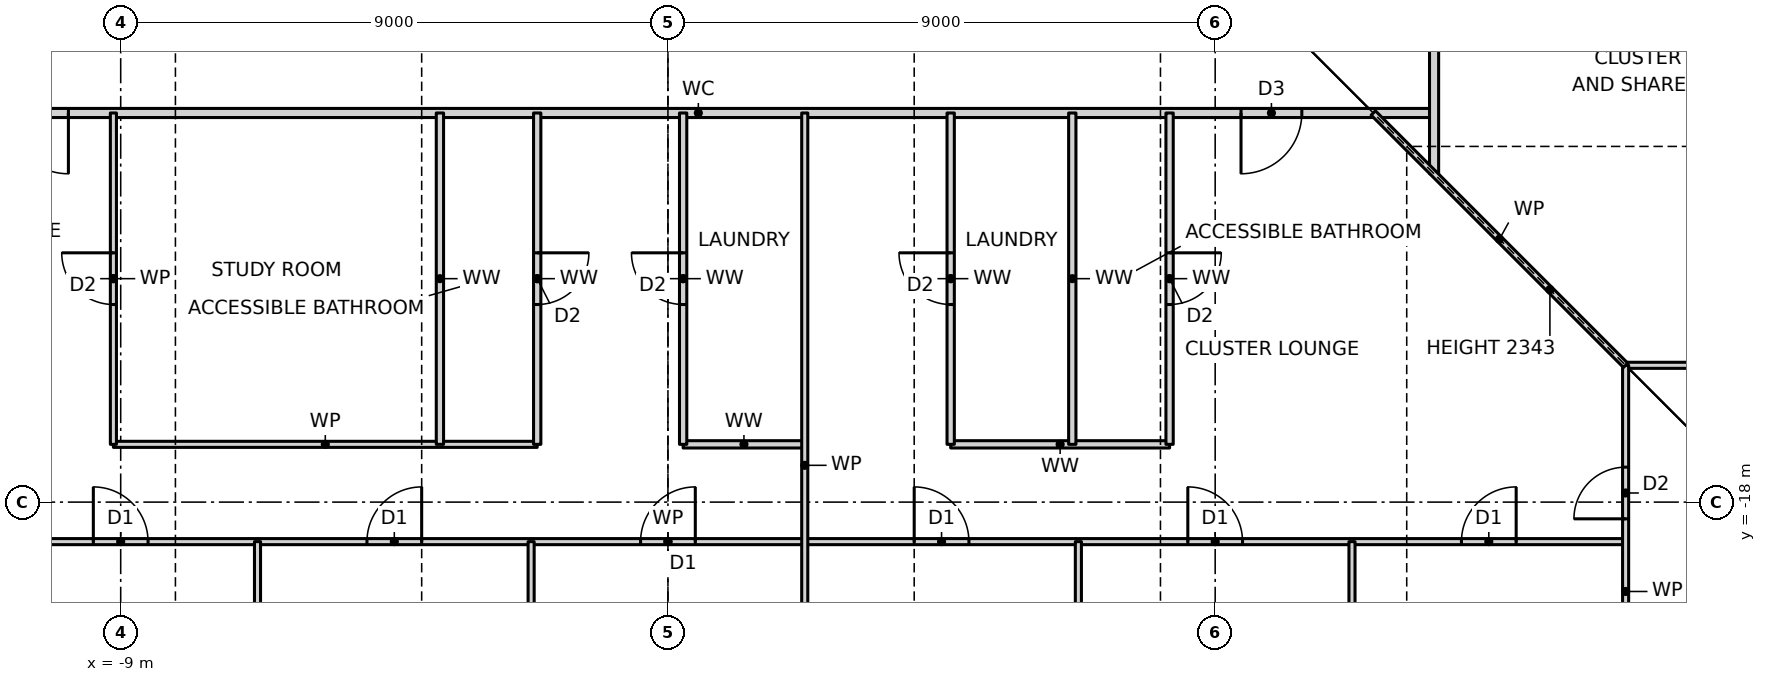
"""IFC4 building model, lengths in metres.
Left out: names, types, materials, properties, quantities, classifications, styles, units other than length and angle.
Written with IfcOpenShell. Run it as: python <this file> out.ifc"""

import sys

from ifc_helpers import new_model, si_unit, direction, frame, frame_2d, origin, place, context, subcontext, project, spatial, rectangle, extrude, element, fill, save


model = new_model("IFC4")
c1 = context("Model", 3, precision=1e-05, world=origin(), true_north=direction((0.0, 1.0)))
c2 = subcontext(c1, "Body", "Model", "MODEL_VIEW")
j1 = project(units=[si_unit("LENGTHUNIT", "METRE"), si_unit("PLANEANGLEUNIT", "RADIAN")], contexts=[c1])
p1 = place(None, origin())
s1 = spatial("IfcSite", under=j1, at=p1, CompositionType="ELEMENT")
p2 = place(p1, origin())
s2 = spatial("IfcBuilding", under=s1, at=p2, CompositionType="ELEMENT")
p3 = place(p2, frame((0.0, 0.0, 67.5)))
s3 = spatial("IfcBuildingStorey", under=s2, at=p3, CompositionType="ELEMENT", Elevation=67.5)
p4 = place(p3, frame((-15.75, -18.65, 0.0), z_axis=(0.0, 0.0, 1.0), x_axis=(1.0, 0.0, 0.0)))
e1 = element("IfcWall", 1, at=p4, inside=s3, PredefinedType="PARTITIONING", context=c2, shape_type="SweptSolid", body=[
    extrude(rectangle(XDim=31.5, YDim=0.1, at=frame_2d((15.75, 0.0))), origin(), (0.0, 0.0, 1.0), 3.27),
])
p5 = place(p4, frame((1.8, 0.0, 0.0)))
e2 = element("IfcOpeningElement", 2, at=p5, cuts=e1, PredefinedType="OPENING", context=c2, shape_type="SweptSolid", body=[
    extrude(rectangle(XDim=0.9, YDim=2.1, at=frame_2d((0.45, 1.05))), frame((0.0, 0.06, 0.0), z_axis=(0.0, -1.0, 0.0), x_axis=(1.0, 0.0, 0.0)), (0.0, 0.0, 1.0), 0.12),
])
p6 = place(p4, frame((6.3, 0.0, 0.0)))
e3 = element("IfcOpeningElement", 3, at=p6, cuts=e1, PredefinedType="OPENING", context=c2, shape_type="SweptSolid", body=[
    extrude(rectangle(XDim=0.9, YDim=2.1, at=frame_2d((0.45, 1.05))), frame((0.0, 0.06, 0.0), z_axis=(0.0, -1.0, 0.0), x_axis=(1.0, 0.0, 0.0)), (0.0, 0.0, 1.0), 0.12),
])
p7 = place(p4, frame((10.8, 0.0, 0.0)))
e4 = element("IfcOpeningElement", 4, at=p7, cuts=e1, PredefinedType="OPENING", context=c2, shape_type="SweptSolid", body=[
    extrude(rectangle(XDim=0.9, YDim=2.1, at=frame_2d((0.45, 1.05))), frame((0.0, 0.06, 0.0), z_axis=(0.0, -1.0, 0.0), x_axis=(1.0, 0.0, 0.0)), (0.0, 0.0, 1.0), 0.12),
])
p8 = place(p4, frame((15.3, 0.0, 0.0)))
e5 = element("IfcOpeningElement", 5, at=p8, cuts=e1, PredefinedType="OPENING", context=c2, shape_type="SweptSolid", body=[
    extrude(rectangle(XDim=0.9, YDim=2.1, at=frame_2d((0.45, 1.05))), frame((0.0, 0.06, 0.0), z_axis=(0.0, -1.0, 0.0), x_axis=(1.0, 0.0, 0.0)), (0.0, 0.0, 1.0), 0.12),
])
p9 = place(p4, frame((19.8, 0.0, 0.0)))
e6 = element("IfcOpeningElement", 6, at=p9, cuts=e1, PredefinedType="OPENING", context=c2, shape_type="SweptSolid", body=[
    extrude(rectangle(XDim=0.9, YDim=2.1, at=frame_2d((0.45, 1.05))), frame((0.0, 0.06, 0.0), z_axis=(0.0, -1.0, 0.0), x_axis=(1.0, 0.0, 0.0)), (0.0, 0.0, 1.0), 0.12),
])
p10 = place(p4, frame((24.3, 0.0, 0.0)))
e7 = element("IfcOpeningElement", 7, at=p10, cuts=e1, PredefinedType="OPENING", context=c2, shape_type="SweptSolid", body=[
    extrude(rectangle(XDim=0.9, YDim=2.1, at=frame_2d((0.45, 1.05))), frame((0.0, 0.06, 0.0), z_axis=(0.0, -1.0, 0.0), x_axis=(1.0, 0.0, 0.0)), (0.0, 0.0, 1.0), 0.12),
])
p11 = place(p4, frame((28.8, 0.0, 0.0)))
e8 = element("IfcOpeningElement", 8, at=p11, cuts=e1, PredefinedType="OPENING", context=c2, shape_type="SweptSolid", body=[
    extrude(rectangle(XDim=0.9, YDim=2.1, at=frame_2d((0.45, 1.05))), frame((0.0, 0.06, 0.0), z_axis=(0.0, -1.0, 0.0), x_axis=(1.0, 0.0, 0.0)), (0.0, 0.0, 1.0), 0.12),
])
p12 = place(p3, frame((-9.12, -17.05, 0.0), z_axis=(0.0, 0.0, 1.0), x_axis=(1.0, 0.0, 0.0)))
e9 = element("IfcWall", 9, at=p12, inside=s3, PredefinedType="PARTITIONING", context=c2, shape_type="SweptSolid", body=[
    extrude(rectangle(XDim=6.97, YDim=0.1, at=frame_2d((3.485, 0.0))), origin(), (0.0, 0.0, 1.0), 3.27),
])
p13 = place(p3, frame((0.25, -17.05, 0.0), z_axis=(0.0, 0.0, 1.0), x_axis=(1.0, 0.0, 0.0)))
e10 = element("IfcWall", 10, at=p13, inside=s3, PredefinedType="PARTITIONING", context=c2, shape_type="SweptSolid", body=[
    extrude(rectangle(XDim=2.0, YDim=0.12, at=frame_2d((1.0, 0.0))), origin(), (0.0, 0.0, 1.0), 3.27),
])
p14 = place(p3, frame((4.65, -17.05, 0.0), z_axis=(0.0, 0.0, 1.0), x_axis=(1.0, 0.0, 0.0)))
e11 = element("IfcWall", 11, at=p14, inside=s3, PredefinedType="PARTITIONING", context=c2, shape_type="SweptSolid", body=[
    extrude(rectangle(XDim=3.6, YDim=0.12, at=frame_2d((1.8, 0.0))), origin(), (0.0, 0.0, 1.0), 3.27),
])
p15 = place(p3, frame((15.75, -15.75, 0.0), z_axis=(0.0, 0.0, 1.0), x_axis=(1.0, 0.0, 0.0)))
e12 = element("IfcWall", 12, at=p15, inside=s3, PredefinedType="PARTITIONING", context=c2, shape_type="SweptSolid", body=[
    extrude(rectangle(XDim=7.44, YDim=0.1, at=frame_2d((3.72, 0.0))), origin(), (0.0, 0.0, 1.0), 3.27),
])
p16 = place(p3, frame((-11.6, -11.6, 0.0), z_axis=(0.0, 0.0, 1.0), x_axis=(1.0, 0.0, 0.0)))
e13 = element("IfcWall", 13, at=p16, inside=s3, PredefinedType="PARTITIONING", context=c2, shape_type="SweptSolid", body=[
    extrude(rectangle(XDim=24.2, YDim=0.15, at=frame_2d((12.1, 0.0))), origin(), (0.0, 0.0, 1.0), 3.27),
])
p17 = place(p16, frame((0.74, 0.0, 0.0)))
e14 = element("IfcOpeningElement", 14, at=p17, cuts=e13, PredefinedType="OPENING", context=c2, shape_type="SweptSolid", body=[
    extrude(rectangle(XDim=1.0, YDim=2.1, at=frame_2d((0.5, 1.05))), frame((0.0, 0.085, 0.0), z_axis=(0.0, -1.0, 0.0), x_axis=(1.0, 0.0, 0.0)), (0.0, 0.0, 1.0), 0.17),
])
p18 = place(p16, frame((21.025, 0.0, 0.0)))
e15 = element("IfcOpeningElement", 15, at=p18, cuts=e13, PredefinedType="OPENING", context=c2, shape_type="SweptSolid", body=[
    extrude(rectangle(XDim=1.0, YDim=2.1, at=frame_2d((0.5, 1.05))), frame((0.0, 0.085, 0.0), z_axis=(0.0, -1.0, 0.0), x_axis=(1.0, 0.0, 0.0)), (0.0, 0.0, 1.0), 0.17),
])
p19 = place(p3, frame((15.75, -23.19, 0.0), z_axis=(0.0, 0.0, 1.0), x_axis=(0.0, 1.0, 0.0)))
e16 = element("IfcWall", 16, at=p19, inside=s3, PredefinedType="PARTITIONING", context=c2, shape_type="SweptSolid", body=[
    extrude(rectangle(XDim=7.44, YDim=0.1, at=frame_2d((3.72, 0.0))), origin(), (0.0, 0.0, 1.0), 3.27),
])
p20 = place(p19, frame((4.915, 0.0, 0.0)))
e17 = element("IfcOpeningElement", 17, at=p20, cuts=e16, PredefinedType="OPENING", context=c2, shape_type="SweptSolid", body=[
    extrude(rectangle(XDim=0.85, YDim=2.1, at=frame_2d((0.425, 1.05))), frame((0.0, 0.06, 0.0), z_axis=(0.0, -1.0, 0.0), x_axis=(1.0, 0.0, 0.0)), (0.0, 0.0, 1.0), 0.12),
])
p21 = place(p3, frame((12.6, -12.6, 0.0), z_axis=(0.0, 0.0, 1.0), x_axis=(0.0, 1.0, 0.0)))
e18 = element("IfcWall", 18, at=p21, inside=s3, PredefinedType="PARTITIONING", context=c2, shape_type="SweptSolid", body=[
    extrude(rectangle(XDim=25.2, YDim=0.15, at=frame_2d((12.6, 0.0))), origin(), (0.0, 0.0, 1.0), 3.27),
])
p22 = place(p21, frame((17.05, 0.0, 0.0)))
e19 = element("IfcOpeningElement", 19, at=p22, cuts=e18, PredefinedType="OPENING", context=c2, shape_type="SweptSolid", body=[
    extrude(rectangle(XDim=1.0, YDim=2.1, at=frame_2d((0.5, 1.05))), frame((0.0, 0.085, 0.0), z_axis=(0.0, -1.0, 0.0), x_axis=(1.0, 0.0, 0.0)), (0.0, 0.0, 1.0), 0.17),
])
p23 = place(p3, frame((11.25, -23.19, 0.0), z_axis=(0.0, 0.0, 1.0), x_axis=(0.0, 1.0, 0.0)))
e20 = element("IfcWall", 20, at=p23, inside=s3, PredefinedType="PARTITIONING", context=c2, shape_type="SweptSolid", body=[
    extrude(rectangle(XDim=4.54, YDim=0.1, at=frame_2d((2.27, 0.0))), origin(), (0.0, 0.0, 1.0), 3.27),
])
p24 = place(p3, frame((8.25, -17.05, 0.0), z_axis=(0.0, 0.0, 1.0), x_axis=(0.0, 1.0, 0.0)))
e21 = element("IfcWall", 21, at=p24, inside=s3, PredefinedType="PARTITIONING", context=c2, shape_type="SweptSolid", body=[
    extrude(rectangle(XDim=5.45, YDim=0.12, at=frame_2d((2.725, 0.0))), origin(), (0.0, 0.0, 1.0), 3.27),
])
p25 = place(p24, frame((2.3, 0.0, 0.0)))
e22 = element("IfcOpeningElement", 22, at=p25, cuts=e21, PredefinedType="OPENING", context=c2, shape_type="SweptSolid", body=[
    extrude(rectangle(XDim=0.85, YDim=2.1, at=frame_2d((0.425, 1.05))), frame((0.0, 0.07, 0.0), z_axis=(0.0, -1.0, 0.0), x_axis=(1.0, 0.0, 0.0)), (0.0, 0.0, 1.0), 0.14),
])
p26 = place(p3, frame((6.75, -23.19, 0.0), z_axis=(0.0, 0.0, 1.0), x_axis=(0.0, 1.0, 0.0)))
e23 = element("IfcWall", 23, at=p26, inside=s3, PredefinedType="PARTITIONING", context=c2, shape_type="SweptSolid", body=[
    extrude(rectangle(XDim=4.54, YDim=0.1, at=frame_2d((2.27, 0.0))), origin(), (0.0, 0.0, 1.0), 3.27),
])
p27 = place(p3, frame((6.65, -17.05, 0.0), z_axis=(0.0, 0.0, 1.0), x_axis=(0.0, 1.0, 0.0)))
e24 = element("IfcWall", 24, at=p27, inside=s3, PredefinedType="PARTITIONING", context=c2, shape_type="SweptSolid", body=[
    extrude(rectangle(XDim=5.45, YDim=0.12, at=frame_2d((2.725, 0.0))), origin(), (0.0, 0.0, 1.0), 3.27),
])
p28 = place(p3, frame((4.65, -17.05, 0.0), z_axis=(0.0, 0.0, 1.0), x_axis=(0.0, 1.0, 0.0)))
e25 = element("IfcWall", 25, at=p28, inside=s3, PredefinedType="PARTITIONING", context=c2, shape_type="SweptSolid", body=[
    extrude(rectangle(XDim=5.45, YDim=0.12, at=frame_2d((2.725, 0.0))), origin(), (0.0, 0.0, 1.0), 3.27),
])
p29 = place(p28, frame((2.3, 0.0, 0.0)))
e26 = element("IfcOpeningElement", 26, at=p29, cuts=e25, PredefinedType="OPENING", context=c2, shape_type="SweptSolid", body=[
    extrude(rectangle(XDim=0.85, YDim=2.1, at=frame_2d((0.425, 1.05))), frame((0.0, 0.07, 0.0), z_axis=(0.0, -1.0, 0.0), x_axis=(1.0, 0.0, 0.0)), (0.0, 0.0, 1.0), 0.14),
])
p30 = place(p3, frame((2.25, -23.19, 0.0), z_axis=(0.0, 0.0, 1.0), x_axis=(0.0, 1.0, 0.0)))
e27 = element("IfcWall", 27, at=p30, inside=s3, PredefinedType="PARTITIONING", context=c2, shape_type="SweptSolid", body=[
    extrude(rectangle(XDim=11.59, YDim=0.1, at=frame_2d((5.795, 0.0))), origin(), (0.0, 0.0, 1.0), 3.27),
])
p31 = place(p3, frame((0.25, -17.05, 0.0), z_axis=(0.0, 0.0, 1.0), x_axis=(0.0, 1.0, 0.0)))
e28 = element("IfcWall", 28, at=p31, inside=s3, PredefinedType="PARTITIONING", context=c2, shape_type="SweptSolid", body=[
    extrude(rectangle(XDim=5.45, YDim=0.12, at=frame_2d((2.725, 0.0))), origin(), (0.0, 0.0, 1.0), 3.27),
])
p32 = place(p31, frame((2.3, 0.0, 0.0)))
e29 = element("IfcOpeningElement", 29, at=p32, cuts=e28, PredefinedType="OPENING", context=c2, shape_type="SweptSolid", body=[
    extrude(rectangle(XDim=0.85, YDim=2.1, at=frame_2d((0.425, 1.05))), frame((0.0, 0.07, 0.0), z_axis=(0.0, -1.0, 0.0), x_axis=(1.0, 0.0, 0.0)), (0.0, 0.0, 1.0), 0.14),
])
p33 = place(p3, frame((-2.15, -17.05, 0.0), z_axis=(0.0, 0.0, 1.0), x_axis=(0.0, 1.0, 0.0)))
e30 = element("IfcWall", 30, at=p33, inside=s3, PredefinedType="PARTITIONING", context=c2, shape_type="SweptSolid", body=[
    extrude(rectangle(XDim=5.45, YDim=0.12, at=frame_2d((2.725, 0.0))), origin(), (0.0, 0.0, 1.0), 3.27),
])
p34 = place(p33, frame((2.3, 0.0, 0.0)))
e31 = element("IfcOpeningElement", 31, at=p34, cuts=e30, PredefinedType="OPENING", context=c2, shape_type="SweptSolid", body=[
    extrude(rectangle(XDim=0.85, YDim=2.1, at=frame_2d((0.425, 1.05))), frame((0.0, 0.07, 0.0), z_axis=(0.0, -1.0, 0.0), x_axis=(1.0, 0.0, 0.0)), (0.0, 0.0, 1.0), 0.14),
])
p35 = place(p3, frame((-2.25, -23.19, 0.0), z_axis=(0.0, 0.0, 1.0), x_axis=(0.0, 1.0, 0.0)))
e32 = element("IfcWall", 32, at=p35, inside=s3, PredefinedType="PARTITIONING", context=c2, shape_type="SweptSolid", body=[
    extrude(rectangle(XDim=4.54, YDim=0.1, at=frame_2d((2.27, 0.0))), origin(), (0.0, 0.0, 1.0), 3.27),
])
p36 = place(p3, frame((-3.75, -17.05, 0.0), z_axis=(0.0, 0.0, 1.0), x_axis=(0.0, 1.0, 0.0)))
e33 = element("IfcWall", 33, at=p36, inside=s3, PredefinedType="PARTITIONING", context=c2, shape_type="SweptSolid", body=[
    extrude(rectangle(XDim=5.45, YDim=0.12, at=frame_2d((2.725, 0.0))), origin(), (0.0, 0.0, 1.0), 3.27),
])
p37 = place(p3, frame((-6.75, -23.19, 0.0), z_axis=(0.0, 0.0, 1.0), x_axis=(0.0, 1.0, 0.0)))
e34 = element("IfcWall", 34, at=p37, inside=s3, PredefinedType="PARTITIONING", context=c2, shape_type="SweptSolid", body=[
    extrude(rectangle(XDim=4.54, YDim=0.1, at=frame_2d((2.27, 0.0))), origin(), (0.0, 0.0, 1.0), 3.27),
])
p38 = place(p3, frame((-9.12, -17.05, 0.0), z_axis=(0.0, 0.0, 1.0), x_axis=(0.0, 1.0, 0.0)))
e35 = element("IfcWall", 35, at=p38, inside=s3, PredefinedType="PARTITIONING", context=c2, shape_type="SweptSolid", body=[
    extrude(rectangle(XDim=5.45, YDim=0.1, at=frame_2d((2.725, 0.0))), origin(), (0.0, 0.0, 1.0), 3.27),
])
p39 = place(p38, frame((2.3, 0.0, 0.0)))
e36 = element("IfcOpeningElement", 36, at=p39, cuts=e35, PredefinedType="OPENING", context=c2, shape_type="SweptSolid", body=[
    extrude(rectangle(XDim=0.85, YDim=2.1, at=frame_2d((0.425, 1.05))), frame((0.0, 0.06, 0.0), z_axis=(0.0, -1.0, 0.0), x_axis=(1.0, 0.0, 0.0)), (0.0, 0.0, 1.0), 0.12),
])
p40 = place(p3, frame((15.75, -15.75, 0.0), z_axis=(0.0, 0.0, 1.0), x_axis=(-0.707106781187, 0.707106781187, 0.0)))
e37 = element("IfcWall", 37, at=p40, inside=s3, PredefinedType="PARTITIONING", context=c2, shape_type="SweptSolid", body=[
    extrude(rectangle(XDim=5.869, YDim=0.1, at=frame_2d((2.935, 0.0))), origin(), (0.0, 0.0, 1.0), 2.343),
])
p41 = place(p6, origin())
e38 = element("IfcDoor", 38, at=p41, inside=s3, OperationType="SINGLE_SWING_LEFT", PredefinedType="DOOR", context=c2, shape_type="SweptSolid", body=[
    extrude(rectangle(XDim=0.9, YDim=2.1, at=frame_2d((0.45, 1.05))), frame((0.0, 0.025, 0.0), z_axis=(0.0, -1.0, 0.0), x_axis=(1.0, 0.0, 0.0)), (0.0, 0.0, 1.0), 0.05),
])
fill(e3, e38)
p42 = place(p7, origin())
e39 = element("IfcDoor", 39, at=p42, inside=s3, OperationType="SINGLE_SWING_RIGHT", PredefinedType="DOOR", context=c2, shape_type="SweptSolid", body=[
    extrude(rectangle(XDim=0.9, YDim=2.1, at=frame_2d((0.45, 1.05))), frame((0.0, 0.025, 0.0), z_axis=(0.0, -1.0, 0.0), x_axis=(1.0, 0.0, 0.0)), (0.0, 0.0, 1.0), 0.05),
])
fill(e4, e39)
p43 = place(p8, origin())
e40 = element("IfcDoor", 40, at=p43, inside=s3, OperationType="SINGLE_SWING_RIGHT", PredefinedType="DOOR", context=c2, shape_type="SweptSolid", body=[
    extrude(rectangle(XDim=0.9, YDim=2.1, at=frame_2d((0.45, 1.05))), frame((0.0, 0.025, 0.0), z_axis=(0.0, -1.0, 0.0), x_axis=(1.0, 0.0, 0.0)), (0.0, 0.0, 1.0), 0.05),
])
fill(e5, e40)
p44 = place(p17, frame((1.0, 0.0, 0.0), z_axis=(0.0, 0.0, 1.0), x_axis=(-1.0, 0.0, 0.0)))
e41 = element("IfcDoor", 41, at=p44, inside=s3, OperationType="SINGLE_SWING_LEFT", PredefinedType="DOOR", context=c2, shape_type="SweptSolid", body=[
    extrude(rectangle(XDim=1.0, YDim=2.1, at=frame_2d((0.5, 1.05))), frame((0.0, 0.025, 0.0), z_axis=(0.0, -1.0, 0.0), x_axis=(1.0, 0.0, 0.0)), (0.0, 0.0, 1.0), 0.05),
])
fill(e14, e41)
p45 = place(p39, origin())
e42 = element("IfcDoor", 42, at=p45, inside=s3, OperationType="SINGLE_SWING_RIGHT", PredefinedType="DOOR", context=c2, shape_type="SweptSolid", body=[
    extrude(rectangle(XDim=0.85, YDim=2.1, at=frame_2d((0.425, 1.05))), frame((0.0, 0.025, 0.0), z_axis=(0.0, -1.0, 0.0), x_axis=(1.0, 0.0, 0.0)), (0.0, 0.0, 1.0), 0.05),
])
fill(e36, e42)
p46 = place(p34, frame((0.85, 0.0, 0.0), z_axis=(0.0, 0.0, 1.0), x_axis=(-1.0, 0.0, 0.0)))
e43 = element("IfcDoor", 43, at=p46, inside=s3, OperationType="SINGLE_SWING_LEFT", PredefinedType="DOOR", context=c2, shape_type="SweptSolid", body=[
    extrude(rectangle(XDim=0.85, YDim=2.1, at=frame_2d((0.425, 1.05))), frame((0.0, 0.025, 0.0), z_axis=(0.0, -1.0, 0.0), x_axis=(1.0, 0.0, 0.0)), (0.0, 0.0, 1.0), 0.05),
])
fill(e31, e43)
p47 = place(p32, origin())
e44 = element("IfcDoor", 44, at=p47, inside=s3, OperationType="SINGLE_SWING_RIGHT", PredefinedType="DOOR", context=c2, shape_type="SweptSolid", body=[
    extrude(rectangle(XDim=0.85, YDim=2.1, at=frame_2d((0.425, 1.05))), frame((0.0, 0.025, 0.0), z_axis=(0.0, -1.0, 0.0), x_axis=(1.0, 0.0, 0.0)), (0.0, 0.0, 1.0), 0.05),
])
fill(e29, e44)
p48 = place(p9, origin())
e45 = element("IfcDoor", 45, at=p48, inside=s3, OperationType="SINGLE_SWING_LEFT", PredefinedType="DOOR", context=c2, shape_type="SweptSolid", body=[
    extrude(rectangle(XDim=0.9, YDim=2.1, at=frame_2d((0.45, 1.05))), frame((0.0, 0.025, 0.0), z_axis=(0.0, -1.0, 0.0), x_axis=(1.0, 0.0, 0.0)), (0.0, 0.0, 1.0), 0.05),
])
fill(e6, e45)
p49 = place(p10, origin())
e46 = element("IfcDoor", 46, at=p49, inside=s3, OperationType="SINGLE_SWING_LEFT", PredefinedType="DOOR", context=c2, shape_type="SweptSolid", body=[
    extrude(rectangle(XDim=0.9, YDim=2.1, at=frame_2d((0.45, 1.05))), frame((0.0, 0.025, 0.0), z_axis=(0.0, -1.0, 0.0), x_axis=(1.0, 0.0, 0.0)), (0.0, 0.0, 1.0), 0.05),
])
fill(e7, e46)
p50 = place(p11, origin())
e47 = element("IfcDoor", 47, at=p50, inside=s3, OperationType="SINGLE_SWING_RIGHT", PredefinedType="DOOR", context=c2, shape_type="SweptSolid", body=[
    extrude(rectangle(XDim=0.9, YDim=2.1, at=frame_2d((0.45, 1.05))), frame((0.0, 0.025, 0.0), z_axis=(0.0, -1.0, 0.0), x_axis=(1.0, 0.0, 0.0)), (0.0, 0.0, 1.0), 0.05),
])
fill(e8, e47)
p51 = place(p18, frame((1.0, 0.0, 0.0), z_axis=(0.0, 0.0, 1.0), x_axis=(-1.0, 0.0, 0.0)))
e48 = element("IfcDoor", 48, at=p51, inside=s3, OperationType="SINGLE_SWING_RIGHT", PredefinedType="DOOR", context=c2, shape_type="SweptSolid", body=[
    extrude(rectangle(XDim=1.0, YDim=2.1, at=frame_2d((0.5, 1.05))), frame((0.0, 0.025, 0.0), z_axis=(0.0, -1.0, 0.0), x_axis=(1.0, 0.0, 0.0)), (0.0, 0.0, 1.0), 0.05),
])
fill(e15, e48)
p52 = place(p29, origin())
e49 = element("IfcDoor", 49, at=p52, inside=s3, OperationType="SINGLE_SWING_RIGHT", PredefinedType="DOOR", context=c2, shape_type="SweptSolid", body=[
    extrude(rectangle(XDim=0.85, YDim=2.1, at=frame_2d((0.425, 1.05))), frame((0.0, 0.025, 0.0), z_axis=(0.0, -1.0, 0.0), x_axis=(1.0, 0.0, 0.0)), (0.0, 0.0, 1.0), 0.05),
])
fill(e26, e49)
p53 = place(p25, frame((0.85, 0.0, 0.0), z_axis=(0.0, 0.0, 1.0), x_axis=(-1.0, 0.0, 0.0)))
e50 = element("IfcDoor", 50, at=p53, inside=s3, OperationType="SINGLE_SWING_LEFT", PredefinedType="DOOR", context=c2, shape_type="SweptSolid", body=[
    extrude(rectangle(XDim=0.85, YDim=2.1, at=frame_2d((0.425, 1.05))), frame((0.0, 0.025, 0.0), z_axis=(0.0, -1.0, 0.0), x_axis=(1.0, 0.0, 0.0)), (0.0, 0.0, 1.0), 0.05),
])
fill(e22, e50)
p54 = place(p20, origin())
e51 = element("IfcDoor", 51, at=p54, inside=s3, OperationType="SINGLE_SWING_LEFT", PredefinedType="DOOR", context=c2, shape_type="SweptSolid", body=[
    extrude(rectangle(XDim=0.85, YDim=2.1, at=frame_2d((0.425, 1.05))), frame((0.0, 0.025, 0.0), z_axis=(0.0, -1.0, 0.0), x_axis=(1.0, 0.0, 0.0)), (0.0, 0.0, 1.0), 0.05),
])
fill(e17, e51)
save(model, sys.argv[1])
